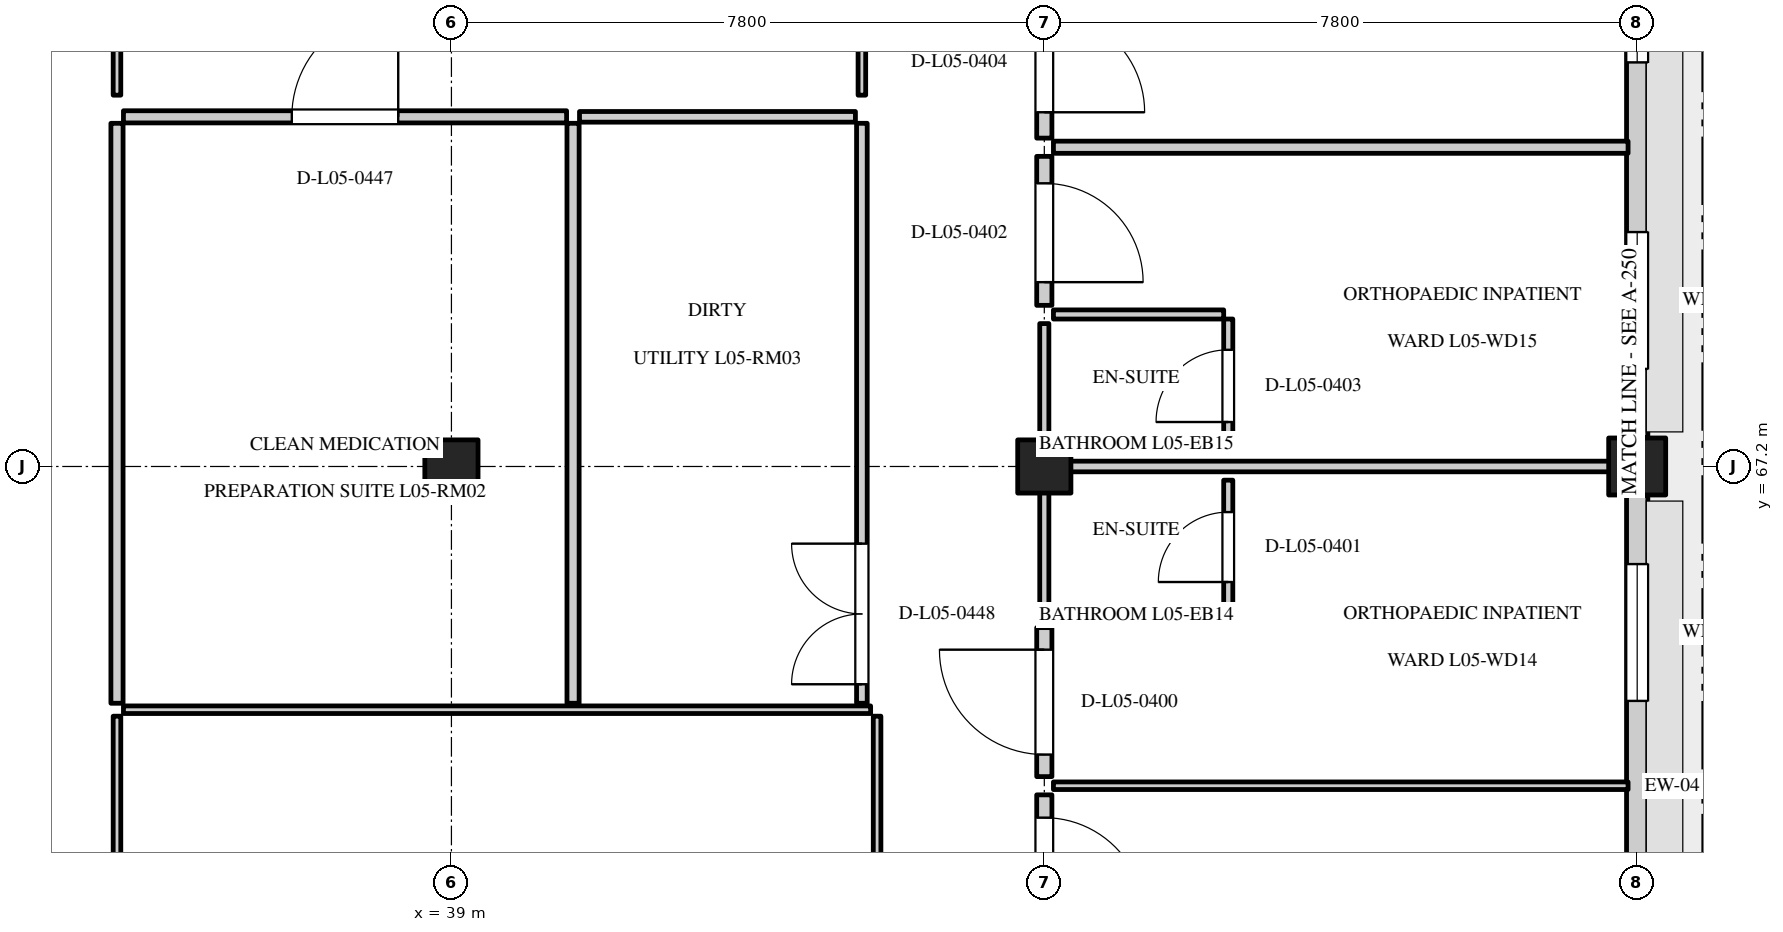
"""IFC4 building model, lengths in metres.
Left out: names, types, materials, properties, quantities, classifications, styles, units other than length and angle.
Written with IfcOpenShell. Run it as: python <this file> out.ifc"""

import sys

from ifc_helpers import new_model, si_unit, direction, frame, frame_2d, origin, origin_2d, place, context, subcontext, project, spatial, rectangle, extrude, element, fill, save


model = new_model("IFC4")
c1 = context("Model", 3, precision=1e-05, world=origin(), true_north=direction((0.0, 1.0)))
c2 = subcontext(c1, "Body", "Model", "MODEL_VIEW")
j1 = project(units=[si_unit("LENGTHUNIT", "METRE"), si_unit("PLANEANGLEUNIT", "RADIAN")], contexts=[c1])
p1 = place(None, origin())
s1 = spatial("IfcSite", under=j1, at=p1, CompositionType="ELEMENT")
p2 = place(p1, origin())
s2 = spatial("IfcBuilding", under=s1, at=p2, CompositionType="ELEMENT")
p3 = place(p2, frame((0.0, 0.0, 22.2)))
s3 = spatial("IfcBuildingStorey", under=s2, at=p3, CompositionType="ELEMENT", Elevation=22.2)
for number, where, z_axis, x_axis in (
    (1, (39.0, 67.2, 0.0), (0.0, 0.0, 1.0), (1.0, 0.0, 0.0)),
    (2, (46.8, 67.2, 0.0), (0.0, 0.0, 1.0), (1.0, 0.0, 0.0)),
):
    element("IfcColumn", number, at=place(p3, frame(where, z_axis=z_axis, x_axis=x_axis)), inside=s3, PredefinedType="COLUMN", context=c2, shape_type="SweptSolid", body=[
        extrude(rectangle(XDim=0.7, YDim=0.7, at=origin_2d()), origin(), (0.0, 0.0, 1.0), 3.9),
    ])
p4 = place(p3, frame((54.6, 67.2, 0.0), z_axis=(0.0, 0.0, 1.0), x_axis=(1.0, 0.0, 0.0)))
e3 = element("IfcColumn", 3, at=p4, inside=s3, PredefinedType="COLUMN", context=c2, shape_type="SweptSolid", body=[
    extrude(rectangle(XDim=0.75, YDim=0.75, at=origin_2d()), origin(), (0.0, 0.0, 1.0), 3.9),
])
p5 = place(p3, frame((54.6, 59.175, 0.0), z_axis=(0.0, 0.0, 1.0), x_axis=(0.0, 1.0, 0.0)))
e4 = element("IfcWall", 4, at=p5, inside=s3, PredefinedType="STANDARD", context=c2, shape_type="SweptSolid", body=[
    extrude(rectangle(XDim=7.65, YDim=0.28, at=frame_2d((3.825, 0.0))), origin(), (0.0, 0.0, 1.0), 2.95),
])
p6 = place(p5, frame((0.909, 0.0, 0.8)))
e5 = element("IfcOpeningElement", 5, at=p6, cuts=e4, PredefinedType="OPENING", context=c2, shape_type="SweptSolid", body=[
    extrude(rectangle(XDim=1.8, YDim=1.75, at=frame_2d((0.9, 0.875))), frame((0.0, 0.152, 0.0), z_axis=(0.0, -1.0, 0.0), x_axis=(1.0, 0.0, 0.0)), (0.0, 0.0, 1.0), 0.304),
])
p7 = place(p5, frame((4.941, 0.0, 0.8)))
e6 = element("IfcOpeningElement", 6, at=p7, cuts=e4, PredefinedType="OPENING", context=c2, shape_type="SweptSolid", body=[
    extrude(rectangle(XDim=1.8, YDim=1.75, at=frame_2d((0.9, 0.875))), frame((0.0, 0.152, 0.0), z_axis=(0.0, -1.0, 0.0), x_axis=(1.0, 0.0, 0.0)), (0.0, 0.0, 1.0), 0.304),
])
p8 = place(p3, frame((54.6, 67.575, 0.0), z_axis=(0.0, 0.0, 1.0), x_axis=(0.0, 1.0, 0.0)))
e7 = element("IfcWall", 7, at=p8, inside=s3, PredefinedType="STANDARD", context=c2, shape_type="SweptSolid", body=[
    extrude(rectangle(XDim=7.65, YDim=0.28, at=frame_2d((3.825, 0.0))), origin(), (0.0, 0.0, 1.0), 2.95),
])
p9 = place(p8, frame((0.909, 0.0, 0.8)))
e8 = element("IfcOpeningElement", 8, at=p9, cuts=e7, PredefinedType="OPENING", context=c2, shape_type="SweptSolid", body=[
    extrude(rectangle(XDim=1.8, YDim=1.65, at=frame_2d((0.9, 0.825))), frame((0.0, 0.152, 0.0), z_axis=(0.0, -1.0, 0.0), x_axis=(1.0, 0.0, 0.0)), (0.0, 0.0, 1.0), 0.304),
])
p10 = place(p8, frame((4.941, 0.0, 0.8)))
e9 = element("IfcOpeningElement", 9, at=p10, cuts=e7, PredefinedType="OPENING", context=c2, shape_type="SweptSolid", body=[
    extrude(rectangle(XDim=1.8, YDim=1.65, at=frame_2d((0.9, 0.825))), frame((0.0, 0.152, 0.0), z_axis=(0.0, -1.0, 0.0), x_axis=(1.0, 0.0, 0.0)), (0.0, 0.0, 1.0), 0.304),
])
p11 = place(p3, frame((46.92, 63.0, 0.0), z_axis=(0.0, 0.0, 1.0), x_axis=(1.0, 0.0, 0.0)))
e10 = element("IfcWall", 10, at=p11, inside=s3, PredefinedType="PARTITIONING", context=c2, shape_type="SweptSolid", body=[
    extrude(rectangle(XDim=7.56, YDim=0.1, at=frame_2d((3.78, 0.0))), origin(), (0.0, 0.0, 1.0), 3.58),
])
p12 = place(p3, frame((46.8, 60.92, 0.0), z_axis=(0.0, 0.0, 1.0), x_axis=(0.0, 1.0, 0.0)))
e11 = element("IfcWall", 11, at=p12, inside=s3, PredefinedType="STANDARD", context=c2, shape_type="SweptSolid", body=[
    extrude(rectangle(XDim=1.96, YDim=0.2, at=frame_2d((0.98, 0.0))), origin(), (0.0, 0.0, 1.0), 3.58),
])
p13 = place(p12, frame((0.34, 0.0, 0.0)))
e12 = element("IfcOpeningElement", 12, at=p13, cuts=e11, PredefinedType="OPENING", context=c2, shape_type="SweptSolid", body=[
    extrude(rectangle(XDim=1.32, YDim=2.2, at=frame_2d((0.66, 1.1))), frame((0.0, 0.112, 0.0), z_axis=(0.0, -1.0, 0.0), x_axis=(1.0, 0.0, 0.0)), (0.0, 0.0, 1.0), 0.224),
])
p14 = place(p3, frame((46.92, 67.2, 0.0), z_axis=(0.0, 0.0, 1.0), x_axis=(1.0, 0.0, 0.0)))
e13 = element("IfcWall", 13, at=p14, inside=s3, PredefinedType="PARTITIONING", context=c2, shape_type="SweptSolid", body=[
    extrude(rectangle(XDim=7.56, YDim=0.14, at=frame_2d((3.78, 0.0))), origin(), (0.0, 0.0, 1.0), 3.58),
])
p15 = place(p3, frame((46.8, 63.12, 0.0), z_axis=(0.0, 0.0, 1.0), x_axis=(0.0, 1.0, 0.0)))
e14 = element("IfcWall", 14, at=p15, inside=s3, PredefinedType="STANDARD", context=c2, shape_type="SweptSolid", body=[
    extrude(rectangle(XDim=1.96, YDim=0.2, at=frame_2d((0.98, 0.0))), origin(), (0.0, 0.0, 1.0), 3.58),
])
p16 = place(p15, frame((0.29, 0.0, 0.0)))
e15 = element("IfcOpeningElement", 15, at=p16, cuts=e14, PredefinedType="OPENING", context=c2, shape_type="SweptSolid", body=[
    extrude(rectangle(XDim=1.38, YDim=2.2, at=frame_2d((0.69, 1.1))), frame((0.0, 0.112, 0.0), z_axis=(0.0, -1.0, 0.0), x_axis=(1.0, 0.0, 0.0)), (0.0, 0.0, 1.0), 0.224),
])
p17 = place(p3, frame((46.8, 65.32, 0.0), z_axis=(0.0, 0.0, 1.0), x_axis=(0.0, 1.0, 0.0)))
e16 = element("IfcWall", 16, at=p17, inside=s3, PredefinedType="PARTITIONING", context=c2, shape_type="SweptSolid", body=[
    extrude(rectangle(XDim=1.76, YDim=0.12, at=frame_2d((0.88, 0.0))), origin(), (0.0, 0.0, 1.0), 3.58),
])
p18 = place(p3, frame((46.92, 65.2, 0.0), z_axis=(0.0, 0.0, 1.0), x_axis=(1.0, 0.0, 0.0)))
e17 = element("IfcWall", 17, at=p18, inside=s3, PredefinedType="PARTITIONING", context=c2, shape_type="SweptSolid", body=[
    extrude(rectangle(XDim=2.24, YDim=0.12, at=frame_2d((1.12, 0.0))), origin(), (0.0, 0.0, 1.0), 3.58),
])
p19 = place(p3, frame((49.22, 65.26, 0.0), z_axis=(0.0, 0.0, 1.0), x_axis=(0.0, 1.0, 0.0)))
e18 = element("IfcWall", 18, at=p19, inside=s3, PredefinedType="PARTITIONING", context=c2, shape_type="SweptSolid", body=[
    extrude(rectangle(XDim=1.76, YDim=0.12, at=frame_2d((0.88, 0.0))), origin(), (0.0, 0.0, 1.0), 3.58),
])
p20 = place(p19, frame((0.42, 0.0, 0.0)))
e19 = element("IfcOpeningElement", 19, at=p20, cuts=e18, PredefinedType="OPENING", context=c2, shape_type="SweptSolid", body=[
    extrude(rectangle(XDim=0.92, YDim=2.08, at=frame_2d((0.46, 1.04))), frame((0.0, 0.072, 0.0), z_axis=(0.0, -1.0, 0.0), x_axis=(1.0, 0.0, 0.0)), (0.0, 0.0, 1.0), 0.144),
])
p21 = place(p3, frame((46.92, 71.4, 0.0), z_axis=(0.0, 0.0, 1.0), x_axis=(1.0, 0.0, 0.0)))
e20 = element("IfcWall", 20, at=p21, inside=s3, PredefinedType="PARTITIONING", context=c2, shape_type="SweptSolid", body=[
    extrude(rectangle(XDim=7.56, YDim=0.16, at=frame_2d((3.78, 0.0))), origin(), (0.0, 0.0, 1.0), 3.58),
])
p22 = place(p3, frame((46.8, 69.32, 0.0), z_axis=(0.0, 0.0, 1.0), x_axis=(0.0, 1.0, 0.0)))
e21 = element("IfcWall", 21, at=p22, inside=s3, PredefinedType="STANDARD", context=c2, shape_type="SweptSolid", body=[
    extrude(rectangle(XDim=1.96, YDim=0.2, at=frame_2d((0.98, 0.0))), origin(), (0.0, 0.0, 1.0), 3.58),
])
p23 = place(p22, frame((0.305, 0.0, 0.0)))
e22 = element("IfcOpeningElement", 22, at=p23, cuts=e21, PredefinedType="OPENING", context=c2, shape_type="SweptSolid", body=[
    extrude(rectangle(XDim=1.3, YDim=2.15, at=frame_2d((0.65, 1.075))), frame((0.0, 0.112, 0.0), z_axis=(0.0, -1.0, 0.0), x_axis=(1.0, 0.0, 0.0)), (0.0, 0.0, 1.0), 0.224),
])
p24 = place(p3, frame((46.8, 67.32, 0.0), z_axis=(0.0, 0.0, 1.0), x_axis=(0.0, 1.0, 0.0)))
e23 = element("IfcWall", 23, at=p24, inside=s3, PredefinedType="PARTITIONING", context=c2, shape_type="SweptSolid", body=[
    extrude(rectangle(XDim=1.76, YDim=0.12, at=frame_2d((0.88, 0.0))), origin(), (0.0, 0.0, 1.0), 3.58),
])
p25 = place(p3, frame((46.92, 69.2, 0.0), z_axis=(0.0, 0.0, 1.0), x_axis=(1.0, 0.0, 0.0)))
e24 = element("IfcWall", 24, at=p25, inside=s3, PredefinedType="PARTITIONING", context=c2, shape_type="SweptSolid", body=[
    extrude(rectangle(XDim=2.24, YDim=0.12, at=frame_2d((1.12, 0.0))), origin(), (0.0, 0.0, 1.0), 3.58),
])
p26 = place(p3, frame((49.22, 67.38, 0.0), z_axis=(0.0, 0.0, 1.0), x_axis=(0.0, 1.0, 0.0)))
e25 = element("IfcWall", 25, at=p26, inside=s3, PredefinedType="PARTITIONING", context=c2, shape_type="SweptSolid", body=[
    extrude(rectangle(XDim=1.76, YDim=0.12, at=frame_2d((0.88, 0.0))), origin(), (0.0, 0.0, 1.0), 3.58),
])
p27 = place(p26, frame((0.405, 0.0, 0.0)))
e26 = element("IfcOpeningElement", 26, at=p27, cuts=e25, PredefinedType="OPENING", context=c2, shape_type="SweptSolid", body=[
    extrude(rectangle(XDim=0.95, YDim=2.1, at=frame_2d((0.475, 1.05))), frame((0.0, 0.072, 0.0), z_axis=(0.0, -1.0, 0.0), x_axis=(1.0, 0.0, 0.0)), (0.0, 0.0, 1.0), 0.144),
])
p28 = place(p3, frame((46.8, 71.52, 0.0), z_axis=(0.0, 0.0, 1.0), x_axis=(0.0, 1.0, 0.0)))
e27 = element("IfcWall", 27, at=p28, inside=s3, PredefinedType="STANDARD", context=c2, shape_type="SweptSolid", body=[
    extrude(rectangle(XDim=1.96, YDim=0.2, at=frame_2d((0.98, 0.0))), origin(), (0.0, 0.0, 1.0), 3.58),
])
p29 = place(p28, frame((0.34, 0.0, 0.0)))
e28 = element("IfcOpeningElement", 28, at=p29, cuts=e27, PredefinedType="OPENING", context=c2, shape_type="SweptSolid", body=[
    extrude(rectangle(XDim=1.32, YDim=2.2, at=frame_2d((0.66, 1.1))), frame((0.0, 0.112, 0.0), z_axis=(0.0, -1.0, 0.0), x_axis=(1.0, 0.0, 0.0)), (0.0, 0.0, 1.0), 0.224),
])
p30 = place(p3, frame((34.685, 64.0, 0.0), z_axis=(0.0, 0.0, 1.0), x_axis=(1.0, 0.0, 0.0)))
e29 = element("IfcWall", 29, at=p30, inside=s3, PredefinedType="PARTITIONING", context=c2, shape_type="SweptSolid", body=[
    extrude(rectangle(XDim=9.83, YDim=0.1, at=frame_2d((4.915, 0.0))), origin(), (0.0, 0.0, 1.0), 3.58),
])
for number, where, z_axis, x_axis in (
    (30, (34.6, 54.085, 0.0), (0.0, 0.0, 1.0), (0.0, 1.0, 0.0)),
    (31, (44.6, 54.085, 0.0), (0.0, 0.0, 1.0), (0.0, 1.0, 0.0)),
):
    element("IfcWall", number, at=place(p3, frame(where, z_axis=z_axis, x_axis=x_axis)), inside=s3, PredefinedType="PARTITIONING", context=c2, shape_type="SweptSolid", body=[
        extrude(rectangle(XDim=9.83, YDim=0.1, at=frame_2d((4.915, 0.0))), origin(), (0.0, 0.0, 1.0), 3.58),
    ])
p31 = place(p3, frame((34.685, 71.8, 0.0), z_axis=(0.0, 0.0, 1.0), x_axis=(1.0, 0.0, 0.0)))
e32 = element("IfcWall", 32, at=p31, inside=s3, PredefinedType="PARTITIONING", context=c2, shape_type="SweptSolid", body=[
    extrude(rectangle(XDim=5.83, YDim=0.16, at=frame_2d((2.915, 0.0))), origin(), (0.0, 0.0, 1.0), 3.58),
])
p32 = place(p31, frame((2.215, 0.0, 0.0)))
e33 = element("IfcOpeningElement", 33, at=p32, cuts=e32, PredefinedType="OPENING", context=c2, shape_type="SweptSolid", body=[
    extrude(rectangle(XDim=1.4, YDim=2.25, at=frame_2d((0.7, 1.125))), frame((0.0, 0.092, 0.0), z_axis=(0.0, -1.0, 0.0), x_axis=(1.0, 0.0, 0.0)), (0.0, 0.0, 1.0), 0.184),
])
for number, where, z_axis, x_axis in (
    (34, (34.6, 64.085, 0.0), (0.0, 0.0, 1.0), (0.0, 1.0, 0.0)),
    (35, (40.6, 64.085, 0.0), (0.0, 0.0, 1.0), (0.0, 1.0, 0.0)),
):
    element("IfcWall", number, at=place(p3, frame(where, z_axis=z_axis, x_axis=x_axis)), inside=s3, PredefinedType="PARTITIONING", context=c2, shape_type="SweptSolid", body=[
        extrude(rectangle(XDim=7.63, YDim=0.16, at=frame_2d((3.815, 0.0))), origin(), (0.0, 0.0, 1.0), 3.58),
    ])
p33 = place(p3, frame((44.4, 64.085, 0.0), z_axis=(0.0, 0.0, 1.0), x_axis=(0.0, 1.0, 0.0)))
e36 = element("IfcWall", 36, at=p33, inside=s3, PredefinedType="PARTITIONING", context=c2, shape_type="SweptSolid", body=[
    extrude(rectangle(XDim=7.63, YDim=0.14, at=frame_2d((3.815, 0.0))), origin(), (0.0, 0.0, 1.0), 3.58),
])
p34 = place(p33, frame((0.25, 0.0, 0.0)))
e37 = element("IfcOpeningElement", 37, at=p34, cuts=e36, PredefinedType="OPENING", context=c2, shape_type="SweptSolid", body=[
    extrude(rectangle(XDim=1.85, YDim=2.3, at=frame_2d((0.925, 1.15))), frame((0.0, 0.082, 0.0), z_axis=(0.0, -1.0, 0.0), x_axis=(1.0, 0.0, 0.0)), (0.0, 0.0, 1.0), 0.164),
])
p35 = place(p3, frame((40.685, 71.8, 0.0), z_axis=(0.0, 0.0, 1.0), x_axis=(1.0, 0.0, 0.0)))
e38 = element("IfcWall", 38, at=p35, inside=s3, PredefinedType="PARTITIONING", context=c2, shape_type="SweptSolid", body=[
    extrude(rectangle(XDim=3.63, YDim=0.14, at=frame_2d((1.815, 0.0))), origin(), (0.0, 0.0, 1.0), 3.58),
])
for number, where, z_axis, x_axis in (
    (39, (34.6, 72.085, 0.0), (0.0, 0.0, 1.0), (0.0, 1.0, 0.0)),
    (40, (44.4, 72.085, 0.0), (0.0, 0.0, 1.0), (0.0, 1.0, 0.0)),
):
    element("IfcWall", number, at=place(p3, frame(where, z_axis=z_axis, x_axis=x_axis)), inside=s3, PredefinedType="PARTITIONING", context=c2, shape_type="SweptSolid", body=[
        extrude(rectangle(XDim=8.63, YDim=0.1, at=frame_2d((4.315, 0.0))), origin(), (0.0, 0.0, 1.0), 3.58),
    ])
p36 = place(p7, origin())
e41 = element("IfcWindow", 41, at=p36, inside=s3, PartitioningType="DOUBLE_PANEL_VERTICAL", PredefinedType="WINDOW", context=c2, shape_type="SweptSolid", body=[
    extrude(rectangle(XDim=1.8, YDim=1.75, at=frame_2d((0.9, 0.875))), frame((0.0, 0.03, 0.0), z_axis=(0.0, -1.0, 0.0), x_axis=(1.0, 0.0, 0.0)), (0.0, 0.0, 1.0), 0.06),
])
fill(e6, e41)
p37 = place(p9, origin())
e42 = element("IfcWindow", 42, at=p37, inside=s3, PartitioningType="DOUBLE_PANEL_VERTICAL", PredefinedType="WINDOW", context=c2, shape_type="SweptSolid", body=[
    extrude(rectangle(XDim=1.8, YDim=1.65, at=frame_2d((0.9, 0.825))), frame((0.0, 0.03, 0.0), z_axis=(0.0, -1.0, 0.0), x_axis=(1.0, 0.0, 0.0)), (0.0, 0.0, 1.0), 0.06),
])
fill(e8, e42)
p38 = place(p10, origin())
e43 = element("IfcWindow", 43, at=p38, inside=s3, PartitioningType="DOUBLE_PANEL_VERTICAL", PredefinedType="WINDOW", context=c2, shape_type="SweptSolid", body=[
    extrude(rectangle(XDim=1.8, YDim=1.65, at=frame_2d((0.9, 0.825))), frame((0.0, 0.03, 0.0), z_axis=(0.0, -1.0, 0.0), x_axis=(1.0, 0.0, 0.0)), (0.0, 0.0, 1.0), 0.06),
])
fill(e9, e43)
p39 = place(p13, frame((1.32, 0.0, 0.0), z_axis=(0.0, 0.0, 1.0), x_axis=(-1.0, 0.0, 0.0)))
e44 = element("IfcDoor", 44, at=p39, inside=s3, OperationType="SINGLE_SWING_RIGHT", PredefinedType="DOOR", context=c2, shape_type="SweptSolid", body=[
    extrude(rectangle(XDim=1.32, YDim=2.2, at=frame_2d((0.66, 1.1))), frame((0.0, 0.025, 0.0), z_axis=(0.0, -1.0, 0.0), x_axis=(1.0, 0.0, 0.0)), (0.0, 0.0, 1.0), 0.05),
])
fill(e12, e44)
p40 = place(p16, frame((1.38, 0.0, 0.0), z_axis=(0.0, 0.0, 1.0), x_axis=(-1.0, 0.0, 0.0)))
e45 = element("IfcDoor", 45, at=p40, inside=s3, OperationType="SINGLE_SWING_LEFT", PredefinedType="DOOR", context=c2, shape_type="SweptSolid", body=[
    extrude(rectangle(XDim=1.38, YDim=2.2, at=frame_2d((0.69, 1.1))), frame((0.0, 0.025, 0.0), z_axis=(0.0, -1.0, 0.0), x_axis=(1.0, 0.0, 0.0)), (0.0, 0.0, 1.0), 0.05),
])
fill(e15, e45)
p41 = place(p20, origin())
e46 = element("IfcDoor", 46, at=p41, inside=s3, OperationType="SINGLE_SWING_LEFT", PredefinedType="DOOR", context=c2, shape_type="SweptSolid", body=[
    extrude(rectangle(XDim=0.92, YDim=2.08, at=frame_2d((0.46, 1.04))), frame((0.0, 0.025, 0.0), z_axis=(0.0, -1.0, 0.0), x_axis=(1.0, 0.0, 0.0)), (0.0, 0.0, 1.0), 0.05),
])
fill(e19, e46)
p42 = place(p23, frame((1.3, 0.0, 0.0), z_axis=(0.0, 0.0, 1.0), x_axis=(-1.0, 0.0, 0.0)))
e47 = element("IfcDoor", 47, at=p42, inside=s3, OperationType="SINGLE_SWING_RIGHT", PredefinedType="DOOR", context=c2, shape_type="SweptSolid", body=[
    extrude(rectangle(XDim=1.3, YDim=2.15, at=frame_2d((0.65, 1.075))), frame((0.0, 0.025, 0.0), z_axis=(0.0, -1.0, 0.0), x_axis=(1.0, 0.0, 0.0)), (0.0, 0.0, 1.0), 0.05),
])
fill(e22, e47)
p43 = place(p27, origin())
e48 = element("IfcDoor", 48, at=p43, inside=s3, OperationType="SINGLE_SWING_LEFT", PredefinedType="DOOR", context=c2, shape_type="SweptSolid", body=[
    extrude(rectangle(XDim=0.95, YDim=2.1, at=frame_2d((0.475, 1.05))), frame((0.0, 0.025, 0.0), z_axis=(0.0, -1.0, 0.0), x_axis=(1.0, 0.0, 0.0)), (0.0, 0.0, 1.0), 0.05),
])
fill(e26, e48)
p44 = place(p29, frame((1.32, 0.0, 0.0), z_axis=(0.0, 0.0, 1.0), x_axis=(-1.0, 0.0, 0.0)))
e49 = element("IfcDoor", 49, at=p44, inside=s3, OperationType="SINGLE_SWING_RIGHT", PredefinedType="DOOR", context=c2, shape_type="SweptSolid", body=[
    extrude(rectangle(XDim=1.32, YDim=2.2, at=frame_2d((0.66, 1.1))), frame((0.0, 0.025, 0.0), z_axis=(0.0, -1.0, 0.0), x_axis=(1.0, 0.0, 0.0)), (0.0, 0.0, 1.0), 0.05),
])
fill(e28, e49)
p45 = place(p32, frame((1.4, 0.0, 0.0), z_axis=(0.0, 0.0, 1.0), x_axis=(-1.0, 0.0, 0.0)))
e50 = element("IfcDoor", 50, at=p45, inside=s3, OperationType="SINGLE_SWING_LEFT", PredefinedType="DOOR", context=c2, shape_type="SweptSolid", body=[
    extrude(rectangle(XDim=1.4, YDim=2.25, at=frame_2d((0.7, 1.125))), frame((0.0, 0.025, 0.0), z_axis=(0.0, -1.0, 0.0), x_axis=(1.0, 0.0, 0.0)), (0.0, 0.0, 1.0), 0.05),
])
fill(e33, e50)
p46 = place(p34, origin())
e51 = element("IfcDoor", 51, at=p46, inside=s3, OperationType="DOUBLE_DOOR_SINGLE_SWING", PredefinedType="DOOR", context=c2, shape_type="SweptSolid", body=[
    extrude(rectangle(XDim=1.85, YDim=2.3, at=frame_2d((0.925, 1.15))), frame((0.0, 0.025, 0.0), z_axis=(0.0, -1.0, 0.0), x_axis=(1.0, 0.0, 0.0)), (0.0, 0.0, 1.0), 0.05),
])
fill(e37, e51)
save(model, sys.argv[1])
